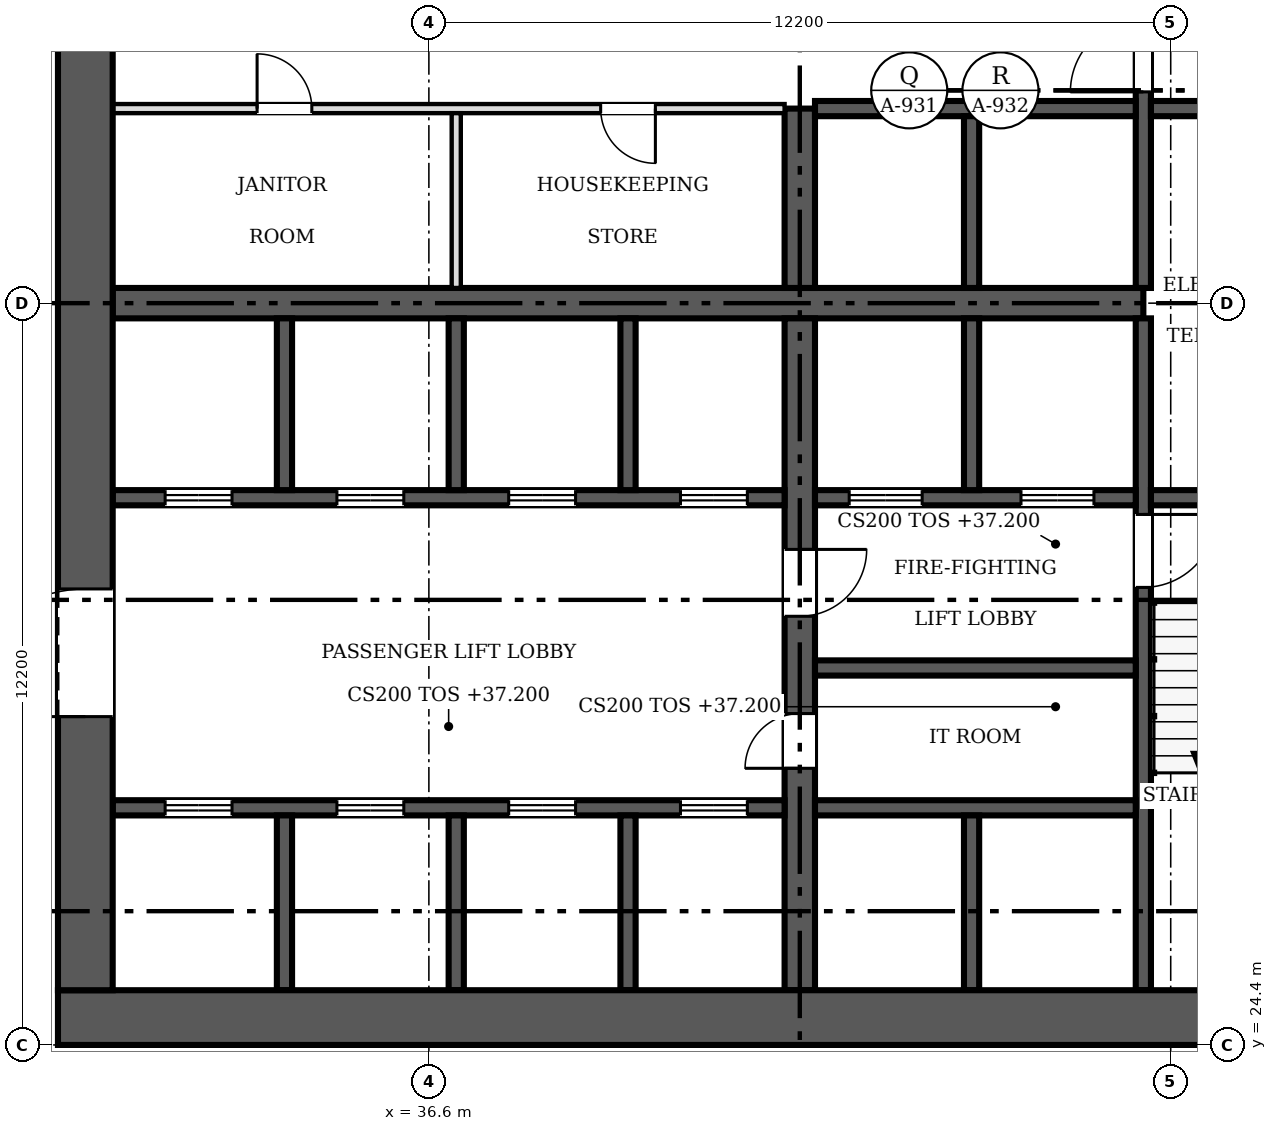
"""IFC4 building model, lengths in metres.
Left out: names, types, materials, properties, quantities, classifications, styles, units other than length and angle.
Written with IfcOpenShell. Run it as: python <this file> out.ifc"""

import sys

from ifc_helpers import new_model, si_unit, direction, frame, frame_2d, origin, place, context, subcontext, project, spatial, rectangle, extrude, source, transform, mapped, element, fill, save


model = new_model("IFC4")
c1 = context("Model", 3, precision=1e-05, world=origin(), true_north=direction((0.0, 1.0)))
c2 = subcontext(c1, "Body", "Model", "MODEL_VIEW")
j1 = project(units=[si_unit("LENGTHUNIT", "METRE"), si_unit("PLANEANGLEUNIT", "RADIAN")], contexts=[c1])
p1 = place(None, origin())
s1 = spatial("IfcSite", under=j1, at=p1, CompositionType="ELEMENT")
p2 = place(p1, origin())
s2 = spatial("IfcBuilding", under=s1, at=p2, CompositionType="ELEMENT")
p3 = place(p2, frame((0.0, 0.0, 37.2)))
s3 = spatial("IfcBuildingStorey", under=s2, at=p3, CompositionType="ELEMENT", Elevation=37.2)
p4 = place(p3, frame((54.9, 24.85, 0.0), z_axis=(0.0, 0.0, 1.0), x_axis=(-1.0, 0.0, 0.0)))
e1 = element("IfcWall", 1, at=p4, inside=s3, PredefinedType="SHEAR", context=c2, shape_type="SweptSolid", body=[
    extrude(rectangle(XDim=24.4, YDim=0.9, at=frame_2d((12.2, 0.0))), origin(), (0.0, 0.0, 1.0), 3.8),
])
m1 = source(origin(), c2, "Body", "SweptSolid", [
    extrude(rectangle(XDim=1.2, YDim=2.1, at=frame_2d((0.6, 1.05))), frame((0.0, 0.46, 0.0), z_axis=(0.0, -1.0, 0.0), x_axis=(1.0, 0.0, 0.0)), (0.0, 0.0, 1.0), 0.92),
])
p5 = place(p4, frame((1.5, 0.0, 0.0)))
e2 = element("IfcOpeningElement", 2, at=p5, cuts=e1, PredefinedType="OPENING", context=c2, shape_type="MappedRepresentation", body=[
    mapped(m1, transform((0.0, 0.0, 0.0), scale=1.0)),
])
p6 = place(p3, frame((30.95, 25.3, 0.0), z_axis=(0.0, 0.0, 1.0), x_axis=(0.0, 1.0, 0.0)))
e3 = element("IfcWall", 3, at=p6, inside=s3, PredefinedType="SHEAR", context=c2, shape_type="SweptSolid", body=[
    extrude(rectangle(XDim=22.6, YDim=0.9, at=frame_2d((11.3, 0.0))), origin(), (0.0, 0.0, 1.0), 3.8),
])
m2 = source(origin(), c2, "Body", "SweptSolid", [
    extrude(rectangle(XDim=2.1, YDim=2.4, at=frame_2d((1.05, 1.2))), frame((0.0, 0.46, 0.0), z_axis=(0.0, -1.0, 0.0), x_axis=(1.0, 0.0, 0.0)), (0.0, 0.0, 1.0), 0.92),
])
p7 = place(p6, frame((4.5, 0.0, 0.0)))
e4 = element("IfcOpeningElement", 4, at=p7, cuts=e3, PredefinedType="OPENING", context=c2, shape_type="MappedRepresentation", body=[
    mapped(m2, transform((0.0, 0.0, 0.0), scale=1.0)),
])
p8 = place(p6, frame((16.0, 0.0, 0.0)))
e5 = element("IfcOpeningElement", 5, at=p8, cuts=e3, PredefinedType="OPENING", context=c2, shape_type="MappedRepresentation", body=[
    mapped(m2, transform((0.0, 0.0, 0.0), scale=1.0)),
])
p9 = place(p3, frame((31.4, 36.6, 0.0), z_axis=(0.0, 0.0, 1.0), x_axis=(1.0, 0.0, 0.0)))
e6 = element("IfcWall", 6, at=p9, inside=s3, PredefinedType="SHEAR", context=c2, shape_type="SweptSolid", body=[
    extrude(rectangle(XDim=16.95, YDim=0.5, at=frame_2d((8.475, 0.0))), origin(), (0.0, 0.0, 1.0), 3.8),
])
p10 = place(p3, frame((42.7, 36.35, 0.0), z_axis=(0.0, 0.0, 1.0), x_axis=(0.0, -1.0, 0.0)))
e7 = element("IfcWall", 7, at=p10, inside=s3, PredefinedType="SHEAR", context=c2, shape_type="SweptSolid", body=[
    extrude(rectangle(XDim=11.05, YDim=0.5, at=frame_2d((5.525, 0.0))), origin(), (0.0, 0.0, 1.0), 3.8),
])
m3 = source(origin(), c2, "Body", "SweptSolid", [
    extrude(rectangle(XDim=0.9, YDim=2.1, at=frame_2d((0.45, 1.05))), frame((0.0, 0.26, 0.0), z_axis=(0.0, -1.0, 0.0), x_axis=(1.0, 0.0, 0.0)), (0.0, 0.0, 1.0), 0.52),
])
p11 = place(p10, frame((6.5, 0.0, 0.0)))
e8 = element("IfcOpeningElement", 8, at=p11, cuts=e7, PredefinedType="OPENING", context=c2, shape_type="MappedRepresentation", body=[
    mapped(m3, transform((0.0, 0.0, 0.0), scale=1.0)),
])
m4 = source(origin(), c2, "Body", "SweptSolid", [
    extrude(rectangle(XDim=1.1, YDim=2.1, at=frame_2d((0.55, 1.05))), frame((0.0, 0.26, 0.0), z_axis=(0.0, -1.0, 0.0), x_axis=(1.0, 0.0, 0.0)), (0.0, 0.0, 1.0), 0.52),
])
p12 = place(p10, frame((3.8, 0.0, 0.0)))
e9 = element("IfcOpeningElement", 9, at=p12, cuts=e7, PredefinedType="OPENING", context=c2, shape_type="MappedRepresentation", body=[
    mapped(m4, transform((0.0, 0.0, 0.0), scale=1.0)),
])
p13 = place(p3, frame((42.7, 36.85, 0.0), z_axis=(0.0, 0.0, 1.0), x_axis=(0.0, 1.0, 0.0)))
e10 = element("IfcWall", 10, at=p13, inside=s3, PredefinedType="SHEAR", context=c2, shape_type="SweptSolid", body=[
    extrude(rectangle(XDim=2.95, YDim=0.5, at=frame_2d((1.475, 0.0))), origin(), (0.0, 0.0, 1.0), 3.8),
])
p14 = place(p3, frame((48.35, 36.35, 0.0), z_axis=(0.0, 0.0, 1.0), x_axis=(0.0, -1.0, 0.0)))
e11 = element("IfcWall", 11, at=p14, inside=s3, PredefinedType="SOLIDWALL", context=c2, shape_type="SweptSolid", body=[
    extrude(rectangle(XDim=11.05, YDim=0.25, at=frame_2d((5.525, 0.0))), origin(), (0.0, 0.0, 1.0), 3.8),
])
m5 = source(origin(), c2, "Body", "SweptSolid", [
    extrude(rectangle(XDim=1.2, YDim=2.1, at=frame_2d((0.6, 1.05))), frame((0.0, 0.135, 0.0), z_axis=(0.0, -1.0, 0.0), x_axis=(1.0, 0.0, 0.0)), (0.0, 0.0, 1.0), 0.27),
])
p15 = place(p14, frame((3.225, 0.0, 0.0)))
e12 = element("IfcOpeningElement", 12, at=p15, cuts=e11, PredefinedType="OPENING", context=c2, shape_type="MappedRepresentation", body=[
    mapped(m5, transform((0.0, 0.0, 0.0), scale=1.0)),
])
p16 = place(p3, frame((48.35, 47.9, 0.0), z_axis=(0.0, 0.0, 1.0), x_axis=(0.0, -1.0, 0.0)))
e13 = element("IfcWall", 13, at=p16, inside=s3, PredefinedType="SOLIDWALL", context=c2, shape_type="SweptSolid", body=[
    extrude(rectangle(XDim=11.05, YDim=0.25, at=frame_2d((5.525, 0.0))), origin(), (0.0, 0.0, 1.0), 3.8),
])
p17 = place(p16, frame((6.625, 0.0, 0.0)))
e14 = element("IfcOpeningElement", 14, at=p17, cuts=e13, PredefinedType="OPENING", context=c2, shape_type="MappedRepresentation", body=[
    mapped(m5, transform((0.0, 0.0, 0.0), scale=1.0)),
])
p18 = place(p3, frame((42.45, 33.4, 0.0), z_axis=(0.0, 0.0, 1.0), x_axis=(-1.0, 0.0, 0.0)))
e15 = element("IfcWall", 15, at=p18, inside=s3, PredefinedType="SOLIDWALL", context=c2, shape_type="SweptSolid", body=[
    extrude(rectangle(XDim=11.05, YDim=0.25, at=frame_2d((5.525, 0.0))), origin(), (0.0, 0.0, 1.0), 3.8),
])
m6 = source(origin(), c2, "Body", "SweptSolid", [
    extrude(rectangle(XDim=1.1, YDim=2.1, at=frame_2d((0.55, 1.05))), frame((0.0, 0.135, 0.0), z_axis=(0.0, -1.0, 0.0), x_axis=(1.0, 0.0, 0.0)), (0.0, 0.0, 1.0), 0.27),
])
p19 = place(p18, frame((9.087, 0.0, 0.0)))
e16 = element("IfcOpeningElement", 16, at=p19, cuts=e15, PredefinedType="OPENING", context=c2, shape_type="MappedRepresentation", body=[
    mapped(m6, transform((0.0, 0.0, 0.0), scale=1.0)),
])
p20 = place(p18, frame((6.262, 0.0, 0.0)))
e17 = element("IfcOpeningElement", 17, at=p20, cuts=e15, PredefinedType="OPENING", context=c2, shape_type="MappedRepresentation", body=[
    mapped(m6, transform((0.0, 0.0, 0.0), scale=1.0)),
])
p21 = place(p18, frame((3.438, 0.0, 0.0)))
e18 = element("IfcOpeningElement", 18, at=p21, cuts=e15, PredefinedType="OPENING", context=c2, shape_type="MappedRepresentation", body=[
    mapped(m6, transform((0.0, 0.0, 0.0), scale=1.0)),
])
p22 = place(p18, frame((0.613, 0.0, 0.0)))
e19 = element("IfcOpeningElement", 19, at=p22, cuts=e15, PredefinedType="OPENING", context=c2, shape_type="MappedRepresentation", body=[
    mapped(m6, transform((0.0, 0.0, 0.0), scale=1.0)),
])
p23 = place(p3, frame((48.225, 33.4, 0.0), z_axis=(0.0, 0.0, 1.0), x_axis=(-1.0, 0.0, 0.0)))
e20 = element("IfcWall", 20, at=p23, inside=s3, PredefinedType="SOLIDWALL", context=c2, shape_type="SweptSolid", body=[
    extrude(rectangle(XDim=5.275, YDim=0.25, at=frame_2d((2.638, 0.0))), origin(), (0.0, 0.0, 1.0), 3.8),
])
p24 = place(p23, frame((3.512, 0.0, 0.0)))
e21 = element("IfcOpeningElement", 21, at=p24, cuts=e20, PredefinedType="OPENING", context=c2, shape_type="MappedRepresentation", body=[
    mapped(m5, transform((0.0, 0.0, 0.0), scale=1.0)),
])
p25 = place(p23, frame((0.688, 0.0, 0.0)))
e22 = element("IfcOpeningElement", 22, at=p25, cuts=e20, PredefinedType="OPENING", context=c2, shape_type="MappedRepresentation", body=[
    mapped(m5, transform((0.0, 0.0, 0.0), scale=1.0)),
])
p26 = place(p3, frame((48.475, 33.4, 0.0), z_axis=(0.0, 0.0, 1.0), x_axis=(1.0, 0.0, 0.0)))
e23 = element("IfcWall", 23, at=p26, inside=s3, PredefinedType="SOLIDWALL", context=c2, shape_type="SweptSolid", body=[
    extrude(rectangle(XDim=3.525, YDim=0.25, at=frame_2d((1.762, 0.0))), origin(), (0.0, 0.0, 1.0), 3.8),
])
p27 = place(p3, frame((31.4, 28.3, 0.0), z_axis=(0.0, 0.0, 1.0), x_axis=(1.0, 0.0, 0.0)))
e24 = element("IfcWall", 24, at=p27, inside=s3, PredefinedType="SOLIDWALL", context=c2, shape_type="SweptSolid", body=[
    extrude(rectangle(XDim=11.05, YDim=0.25, at=frame_2d((5.525, 0.0))), origin(), (0.0, 0.0, 1.0), 3.8),
])
p28 = place(p27, frame((0.863, 0.0, 0.0)))
e25 = element("IfcOpeningElement", 25, at=p28, cuts=e24, PredefinedType="OPENING", context=c2, shape_type="MappedRepresentation", body=[
    mapped(m6, transform((0.0, 0.0, 0.0), scale=1.0)),
])
p29 = place(p27, frame((3.688, 0.0, 0.0)))
e26 = element("IfcOpeningElement", 26, at=p29, cuts=e24, PredefinedType="OPENING", context=c2, shape_type="MappedRepresentation", body=[
    mapped(m6, transform((0.0, 0.0, 0.0), scale=1.0)),
])
p30 = place(p27, frame((6.512, 0.0, 0.0)))
e27 = element("IfcOpeningElement", 27, at=p30, cuts=e24, PredefinedType="OPENING", context=c2, shape_type="MappedRepresentation", body=[
    mapped(m6, transform((0.0, 0.0, 0.0), scale=1.0)),
])
p31 = place(p27, frame((9.337, 0.0, 0.0)))
e28 = element("IfcOpeningElement", 28, at=p31, cuts=e24, PredefinedType="OPENING", context=c2, shape_type="MappedRepresentation", body=[
    mapped(m6, transform((0.0, 0.0, 0.0), scale=1.0)),
])
for number, where, z_axis, x_axis in (
    (29, (42.95, 28.3, 0.0), (0.0, 0.0, 1.0), (1.0, 0.0, 0.0)),
    (30, (42.95, 39.8, 0.0), (0.0, 0.0, 1.0), (1.0, 0.0, 0.0)),
):
    element("IfcWall", number, at=place(p3, frame(where, z_axis=z_axis, x_axis=x_axis)), inside=s3, PredefinedType="SOLIDWALL", context=c2, shape_type="SweptSolid", body=[
        extrude(rectangle(XDim=5.275, YDim=0.25, at=frame_2d((2.638, 0.0))), origin(), (0.0, 0.0, 1.0), 3.8),
    ])
p32 = place(p3, frame((48.475, 39.8, 0.0), z_axis=(0.0, 0.0, 1.0), x_axis=(1.0, 0.0, 0.0)))
e31 = element("IfcWall", 31, at=p32, inside=s3, PredefinedType="SOLIDWALL", context=c2, shape_type="SweptSolid", body=[
    extrude(rectangle(XDim=3.525, YDim=0.25, at=frame_2d((1.762, 0.0))), origin(), (0.0, 0.0, 1.0), 3.8),
])
p33 = place(p3, frame((45.525, 33.525, 0.0), z_axis=(0.0, 0.0, 1.0), x_axis=(0.0, 1.0, 0.0)))
e32 = element("IfcWall", 32, at=p33, inside=s3, PredefinedType="SOLIDWALL", context=c2, shape_type="SweptSolid", body=[
    extrude(rectangle(XDim=2.825, YDim=0.25, at=frame_2d((1.413, 0.0))), origin(), (0.0, 0.0, 1.0), 3.8),
])
p34 = place(p3, frame((45.525, 36.85, 0.0), z_axis=(0.0, 0.0, 1.0), x_axis=(0.0, 1.0, 0.0)))
e33 = element("IfcWall", 33, at=p34, inside=s3, PredefinedType="SOLIDWALL", context=c2, shape_type="SweptSolid", body=[
    extrude(rectangle(XDim=2.825, YDim=0.25, at=frame_2d((1.413, 0.0))), origin(), (0.0, 0.0, 1.0), 3.8),
])
p35 = place(p3, frame((42.95, 30.6, 0.0), z_axis=(0.0, 0.0, 1.0), x_axis=(1.0, 0.0, 0.0)))
e34 = element("IfcWall", 34, at=p35, inside=s3, PredefinedType="SOLIDWALL", context=c2, shape_type="SweptSolid", body=[
    extrude(rectangle(XDim=5.275, YDim=0.25, at=frame_2d((2.638, 0.0))), origin(), (0.0, 0.0, 1.0), 3.8),
])
for number, where, z_axis, x_axis in (
    (35, (34.225, 33.525, 0.0), (0.0, 0.0, 1.0), (0.0, 1.0, 0.0)),
    (36, (37.05, 33.525, 0.0), (0.0, 0.0, 1.0), (0.0, 1.0, 0.0)),
    (37, (39.875, 33.525, 0.0), (0.0, 0.0, 1.0), (0.0, 1.0, 0.0)),
):
    element("IfcWall", number, at=place(p3, frame(where, z_axis=z_axis, x_axis=x_axis)), inside=s3, PredefinedType="SOLIDWALL", context=c2, shape_type="SweptSolid", body=[
        extrude(rectangle(XDim=2.825, YDim=0.25, at=frame_2d((1.413, 0.0))), origin(), (0.0, 0.0, 1.0), 3.8),
    ])
for number, where, z_axis, x_axis in (
    (38, (34.225, 25.3, 0.0), (0.0, 0.0, 1.0), (0.0, 1.0, 0.0)),
    (39, (37.05, 25.3, 0.0), (0.0, 0.0, 1.0), (0.0, 1.0, 0.0)),
    (40, (39.875, 25.3, 0.0), (0.0, 0.0, 1.0), (0.0, 1.0, 0.0)),
    (41, (45.525, 25.3, 0.0), (0.0, 0.0, 1.0), (0.0, 1.0, 0.0)),
):
    element("IfcWall", number, at=place(p3, frame(where, z_axis=z_axis, x_axis=x_axis)), inside=s3, PredefinedType="SOLIDWALL", context=c2, shape_type="SweptSolid", body=[
        extrude(rectangle(XDim=2.875, YDim=0.25, at=frame_2d((1.438, 0.0))), origin(), (0.0, 0.0, 1.0), 3.8),
    ])
p36 = place(p3, frame((42.45, 39.8, 0.0), z_axis=(0.0, 0.0, 1.0), x_axis=(-1.0, 0.0, 0.0)))
e42 = element("IfcWall", 42, at=p36, inside=s3, PredefinedType="PARTITIONING", context=c2, shape_type="SweptSolid", body=[
    extrude(rectangle(XDim=11.05, YDim=0.15, at=frame_2d((5.525, 0.0))), origin(), (0.0, 0.0, 1.0), 3.6),
])
m7 = source(origin(), c2, "Body", "SweptSolid", [
    extrude(rectangle(XDim=0.9, YDim=2.1, at=frame_2d((0.45, 1.05))), frame((0.0, 0.085, 0.0), z_axis=(0.0, -1.0, 0.0), x_axis=(1.0, 0.0, 0.0)), (0.0, 0.0, 1.0), 0.17),
])
p37 = place(p36, frame((7.775, 0.0, 0.0)))
e43 = element("IfcOpeningElement", 43, at=p37, cuts=e42, PredefinedType="OPENING", context=c2, shape_type="MappedRepresentation", body=[
    mapped(m7, transform((0.0, 0.0, 0.0), scale=1.0)),
])
p38 = place(p36, frame((2.125, 0.0, 0.0)))
e44 = element("IfcOpeningElement", 44, at=p38, cuts=e42, PredefinedType="OPENING", context=c2, shape_type="MappedRepresentation", body=[
    mapped(m7, transform((0.0, 0.0, 0.0), scale=1.0)),
])
p39 = place(p3, frame((37.05, 36.85, 0.0), z_axis=(0.0, 0.0, 1.0), x_axis=(0.0, 1.0, 0.0)))
e45 = element("IfcWall", 45, at=p39, inside=s3, PredefinedType="PARTITIONING", context=c2, shape_type="SweptSolid", body=[
    extrude(rectangle(XDim=2.875, YDim=0.15, at=frame_2d((1.438, 0.0))), origin(), (0.0, 0.0, 1.0), 3.6),
])
m8 = source(origin(), c2, "Body", "SweptSolid", [
    extrude(rectangle(XDim=2.1, YDim=2.4, at=frame_2d((1.05, 1.2))), frame((0.0, 0.025, 0.0), z_axis=(0.0, -1.0, 0.0), x_axis=(1.0, 0.0, 0.0)), (0.0, 0.0, 1.0), 0.05),
])
p40 = place(p7, origin())
e46 = element("IfcDoor", 46, at=p40, inside=s3, OperationType="DOUBLE_DOOR_SINGLE_SWING", PredefinedType="DOOR", context=c2, shape_type="MappedRepresentation", body=[
    mapped(m8, transform((0.0, 0.0, 0.0), scale=1.0)),
])
fill(e4, e46)
m9 = source(origin(), c2, "Body", "SweptSolid", [
    extrude(rectangle(XDim=0.9, YDim=2.1, at=frame_2d((0.45, 1.05))), frame((0.0, 0.025, 0.0), z_axis=(0.0, -1.0, 0.0), x_axis=(1.0, 0.0, 0.0)), (0.0, 0.0, 1.0), 0.05),
])
p41 = place(p11, origin())
e47 = element("IfcDoor", 47, at=p41, inside=s3, OperationType="SINGLE_SWING_RIGHT", PredefinedType="DOOR", context=c2, shape_type="MappedRepresentation", body=[
    mapped(m9, transform((0.0, 0.0, 0.0), scale=1.0)),
])
fill(e8, e47)
m10 = source(origin(), c2, "Body", "SweptSolid", [
    extrude(rectangle(XDim=1.1, YDim=2.1, at=frame_2d((0.55, 1.05))), frame((0.0, 0.025, 0.0), z_axis=(0.0, -1.0, 0.0), x_axis=(1.0, 0.0, 0.0)), (0.0, 0.0, 1.0), 0.05),
])
p42 = place(p12, origin())
e48 = element("IfcDoor", 48, at=p42, inside=s3, OperationType="SINGLE_SWING_LEFT", PredefinedType="DOOR", context=c2, shape_type="MappedRepresentation", body=[
    mapped(m10, transform((0.0, 0.0, 0.0), scale=1.0)),
])
fill(e9, e48)
m11 = source(origin(), c2, "Body", "SweptSolid", [
    extrude(rectangle(XDim=1.2, YDim=2.1, at=frame_2d((0.6, 1.05))), frame((0.0, 0.025, 0.0), z_axis=(0.0, -1.0, 0.0), x_axis=(1.0, 0.0, 0.0)), (0.0, 0.0, 1.0), 0.05),
])
p43 = place(p15, origin())
e49 = element("IfcDoor", 49, at=p43, inside=s3, OperationType="SINGLE_SWING_LEFT", PredefinedType="DOOR", context=c2, shape_type="MappedRepresentation", body=[
    mapped(m11, transform((0.0, 0.0, 0.0), scale=1.0)),
])
fill(e12, e49)
p44 = place(p17, origin())
e50 = element("IfcDoor", 50, at=p44, inside=s3, OperationType="SINGLE_SWING_RIGHT", PredefinedType="DOOR", context=c2, shape_type="MappedRepresentation", body=[
    mapped(m11, transform((0.0, 0.0, 0.0), scale=1.0)),
])
fill(e14, e50)
p45 = place(p19, origin())
e51 = element("IfcDoor", 51, at=p45, inside=s3, OperationType="DOUBLE_DOOR_SLIDING", PredefinedType="DOOR", context=c2, shape_type="MappedRepresentation", body=[
    mapped(m10, transform((0.0, 0.0, 0.0), scale=1.0)),
])
fill(e16, e51)
p46 = place(p20, origin())
e52 = element("IfcDoor", 52, at=p46, inside=s3, OperationType="DOUBLE_DOOR_SLIDING", PredefinedType="DOOR", context=c2, shape_type="MappedRepresentation", body=[
    mapped(m10, transform((0.0, 0.0, 0.0), scale=1.0)),
])
fill(e17, e52)
p47 = place(p21, origin())
e53 = element("IfcDoor", 53, at=p47, inside=s3, OperationType="DOUBLE_DOOR_SLIDING", PredefinedType="DOOR", context=c2, shape_type="MappedRepresentation", body=[
    mapped(m10, transform((0.0, 0.0, 0.0), scale=1.0)),
])
fill(e18, e53)
p48 = place(p22, origin())
e54 = element("IfcDoor", 54, at=p48, inside=s3, OperationType="DOUBLE_DOOR_SLIDING", PredefinedType="DOOR", context=c2, shape_type="MappedRepresentation", body=[
    mapped(m10, transform((0.0, 0.0, 0.0), scale=1.0)),
])
fill(e19, e54)
p49 = place(p24, origin())
e55 = element("IfcDoor", 55, at=p49, inside=s3, OperationType="DOUBLE_DOOR_SLIDING", PredefinedType="DOOR", context=c2, shape_type="MappedRepresentation", body=[
    mapped(m11, transform((0.0, 0.0, 0.0), scale=1.0)),
])
fill(e21, e55)
p50 = place(p25, origin())
e56 = element("IfcDoor", 56, at=p50, inside=s3, OperationType="DOUBLE_DOOR_SLIDING", PredefinedType="DOOR", context=c2, shape_type="MappedRepresentation", body=[
    mapped(m11, transform((0.0, 0.0, 0.0), scale=1.0)),
])
fill(e22, e56)
p51 = place(p28, origin())
e57 = element("IfcDoor", 57, at=p51, inside=s3, OperationType="DOUBLE_DOOR_SLIDING", PredefinedType="DOOR", context=c2, shape_type="MappedRepresentation", body=[
    mapped(m10, transform((0.0, 0.0, 0.0), scale=1.0)),
])
fill(e25, e57)
p52 = place(p29, origin())
e58 = element("IfcDoor", 58, at=p52, inside=s3, OperationType="DOUBLE_DOOR_SLIDING", PredefinedType="DOOR", context=c2, shape_type="MappedRepresentation", body=[
    mapped(m10, transform((0.0, 0.0, 0.0), scale=1.0)),
])
fill(e26, e58)
p53 = place(p30, origin())
e59 = element("IfcDoor", 59, at=p53, inside=s3, OperationType="DOUBLE_DOOR_SLIDING", PredefinedType="DOOR", context=c2, shape_type="MappedRepresentation", body=[
    mapped(m10, transform((0.0, 0.0, 0.0), scale=1.0)),
])
fill(e27, e59)
p54 = place(p31, origin())
e60 = element("IfcDoor", 60, at=p54, inside=s3, OperationType="DOUBLE_DOOR_SLIDING", PredefinedType="DOOR", context=c2, shape_type="MappedRepresentation", body=[
    mapped(m10, transform((0.0, 0.0, 0.0), scale=1.0)),
])
fill(e28, e60)
p55 = place(p37, origin())
e61 = element("IfcDoor", 61, at=p55, inside=s3, OperationType="SINGLE_SWING_RIGHT", PredefinedType="DOOR", context=c2, shape_type="MappedRepresentation", body=[
    mapped(m9, transform((0.0, 0.0, 0.0), scale=1.0)),
])
fill(e43, e61)
p56 = place(p38, origin())
e62 = element("IfcDoor", 62, at=p56, inside=s3, OperationType="SINGLE_SWING_LEFT", PredefinedType="DOOR", context=c2, shape_type="MappedRepresentation", body=[
    mapped(m9, transform((0.0, 0.0, 0.0), scale=1.0)),
])
fill(e44, e62)
save(model, sys.argv[1])
